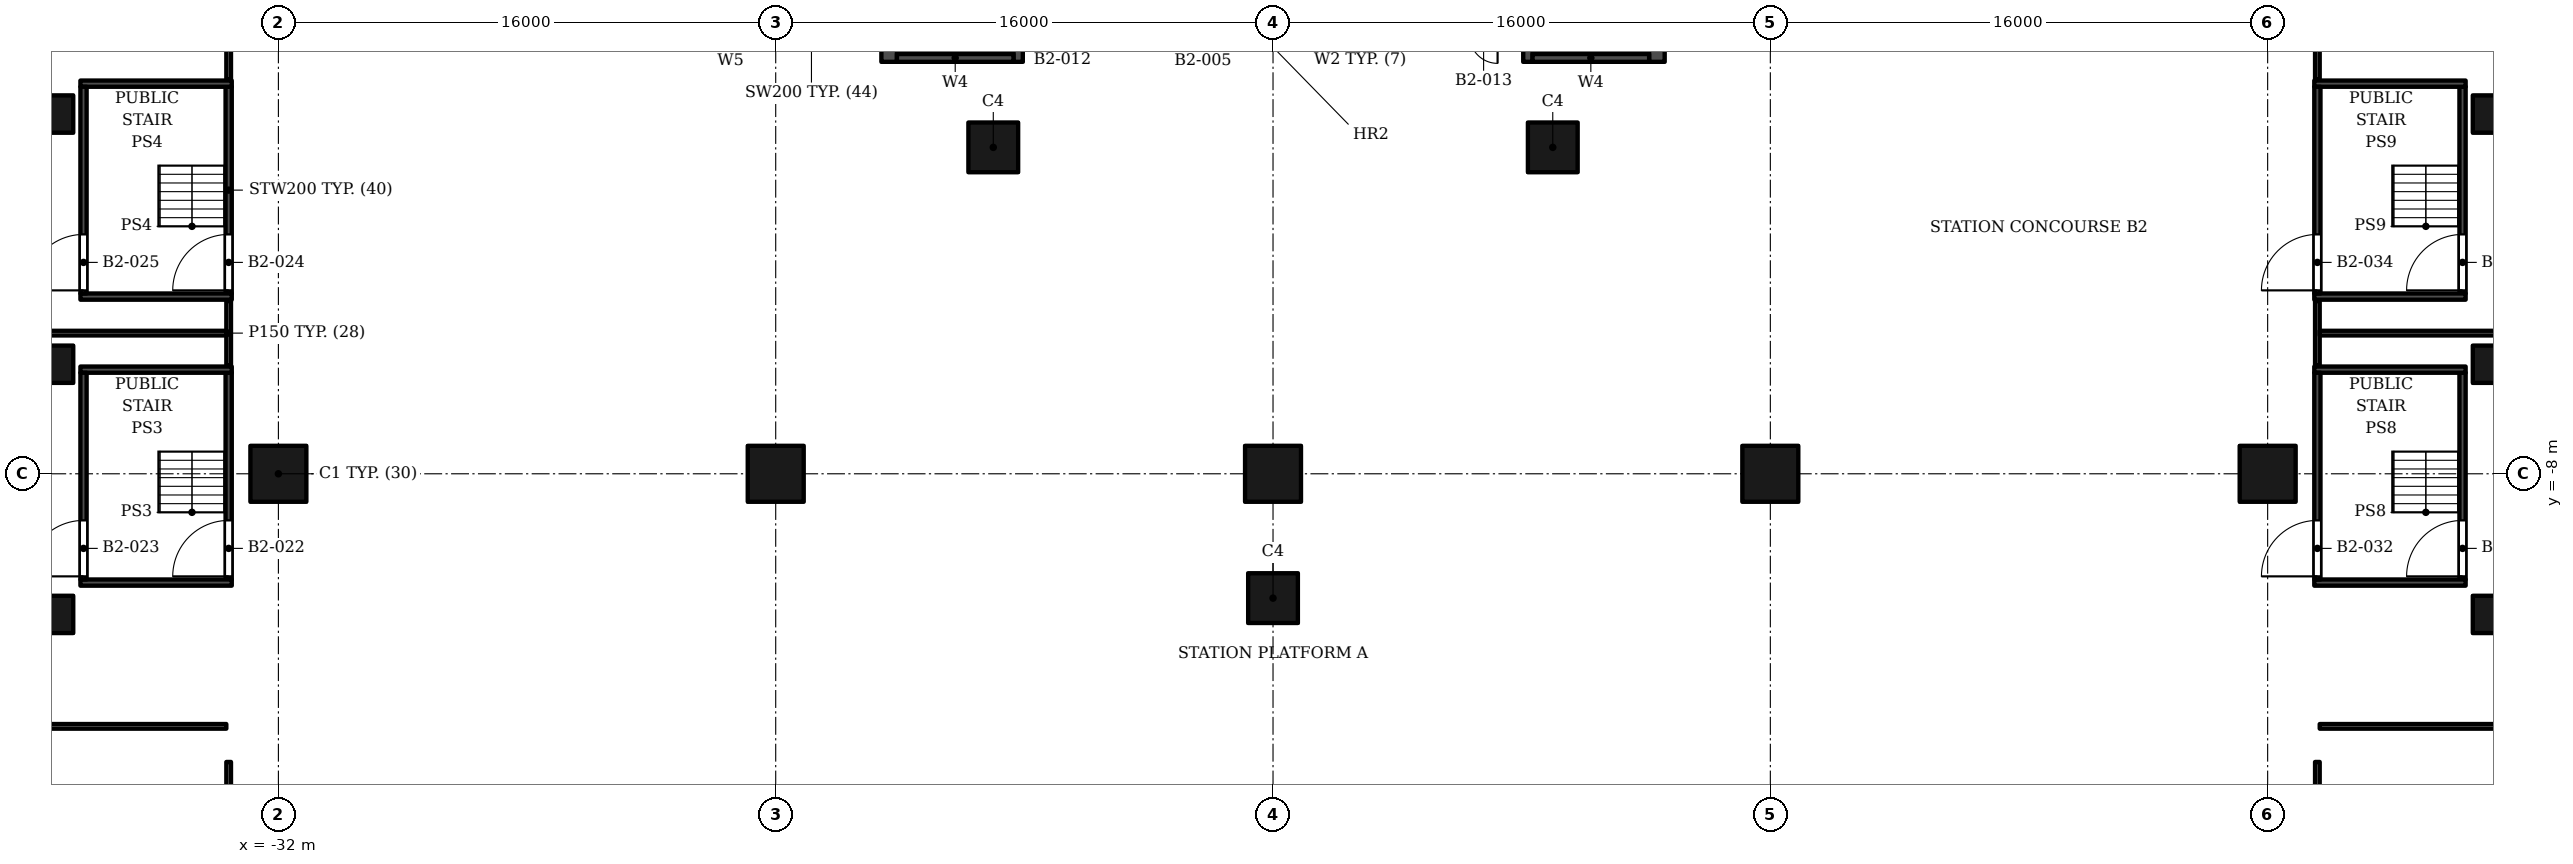
"""IFC4 building model, lengths in metres.
Left out: names, types, materials, properties, quantities, classifications, styles, units other than length and angle.
Written with IfcOpenShell. Run it as: python <this file> out.ifc"""

import sys

from ifc_helpers import new_model, si_unit, direction, frame, frame_2d, origin, origin_2d, place, context, subcontext, project, spatial, rectangle, extrude, element, fill, save


model = new_model("IFC4")
c1 = context("Model", 3, precision=1e-05, world=origin(), true_north=direction((0.0, 1.0)))
c2 = subcontext(c1, "Body", "Model", "MODEL_VIEW")
j1 = project(units=[si_unit("LENGTHUNIT", "METRE"), si_unit("PLANEANGLEUNIT", "RADIAN")], contexts=[c1])
p1 = place(None, origin())
s1 = spatial("IfcSite", under=j1, at=p1, CompositionType="ELEMENT")
p2 = place(p1, origin())
s2 = spatial("IfcBuilding", under=s1, at=p2, CompositionType="ELEMENT")
p3 = place(p2, frame((0.0, 0.0, -10.0)))
s3 = spatial("IfcBuildingStorey", under=s2, at=p3, CompositionType="ELEMENT", Elevation=-10.0)
for number, where, z_axis, x_axis in (
    (1, (-32.0, -8.0, -1.6), (0.0, 0.0, 1.0), (1.0, 0.0, 0.0)),
    (2, (-16.0, -8.0, -1.6), (0.0, 0.0, 1.0), (1.0, 0.0, 0.0)),
    (3, (0.0, -8.0, -1.6), (0.0, 0.0, 1.0), (1.0, 0.0, 0.0)),
    (4, (16.0, -8.0, -1.6), (0.0, 0.0, 1.0), (1.0, 0.0, 0.0)),
    (5, (32.0, -8.0, -1.6), (0.0, 0.0, 1.0), (1.0, 0.0, 0.0)),
):
    element("IfcColumn", number, at=place(p3, frame(where, z_axis=z_axis, x_axis=x_axis)), inside=s3, PredefinedType="COLUMN", context=c2, shape_type="SweptSolid", body=[
        extrude(rectangle(XDim=1.8, YDim=1.8, at=origin_2d()), origin(), (0.0, 0.0, 1.0), 6.6),
    ])
for number, where, z_axis, x_axis in (
    (6, (-39.2, -12.524, -1.6), (0.0, 0.0, 1.0), (1.0, 0.0, 0.0)),
    (7, (-39.2, -4.476, -1.6), (0.0, 0.0, 1.0), (1.0, 0.0, 0.0)),
    (8, (-39.2, 3.572, -1.6), (0.0, 0.0, 1.0), (1.0, 0.0, 0.0)),
    (9, (39.2, 3.572, -1.6), (0.0, 0.0, 1.0), (1.0, 0.0, 0.0)),
    (10, (39.2, -4.476, -1.6), (0.0, 0.0, 1.0), (1.0, 0.0, 0.0)),
    (11, (39.2, -12.524, -1.6), (0.0, 0.0, 1.0), (1.0, 0.0, 0.0)),
):
    element("IfcColumn", number, at=place(p3, frame(where, z_axis=z_axis, x_axis=x_axis)), inside=s3, PredefinedType="COLUMN", context=c2, shape_type="SweptSolid", body=[
        extrude(rectangle(XDim=1.2, YDim=1.2, at=origin_2d()), origin(), (0.0, 0.0, 1.0), 6.6),
    ])
for number, where, z_axis, x_axis in (
    (12, (-9.0, 2.5, -1.6), (0.0, 0.0, 1.0), (1.0, 0.0, 0.0)),
    (13, (9.0, 2.5, -1.6), (0.0, 0.0, 1.0), (1.0, 0.0, 0.0)),
    (14, (0.0, -12.0, -1.6), (0.0, 0.0, 1.0), (1.0, 0.0, 0.0)),
):
    element("IfcColumn", number, at=place(p3, frame(where, z_axis=z_axis, x_axis=x_axis)), inside=s3, PredefinedType="COLUMN", context=c2, shape_type="SweptSolid", body=[
        extrude(rectangle(XDim=1.6, YDim=1.6, at=origin_2d()), origin(), (0.0, 0.0, 1.0), 6.6),
    ])
p4 = place(p3, frame((-12.35, 5.253, -1.6), z_axis=(0.0, 0.0, 1.0), x_axis=(0.0, 1.0, 0.0)))
e15 = element("IfcWall", 15, at=p4, inside=s3, PredefinedType="SHEAR", context=c2, shape_type="SweptSolid", body=[
    extrude(rectangle(XDim=13.3, YDim=0.5, at=frame_2d((6.65, 0.0))), origin(), (0.0, 0.0, 1.0), 6.6),
])
p5 = place(p3, frame((-8.2, 5.253, -1.6), z_axis=(0.0, 0.0, 1.0), x_axis=(0.0, 1.0, 0.0)))
e16 = element("IfcWall", 16, at=p5, inside=s3, PredefinedType="SHEAR", context=c2, shape_type="SweptSolid", body=[
    extrude(rectangle(XDim=13.3, YDim=0.3, at=frame_2d((6.65, 0.0))), origin(), (0.0, 0.0, 1.0), 6.6),
])
p6 = place(p5, frame((7.1, 0.0, 1.6)))
e17 = element("IfcOpeningElement", 17, at=p6, cuts=e16, PredefinedType="OPENING", context=c2, shape_type="SweptSolid", body=[
    extrude(rectangle(XDim=1.4, YDim=2.1, at=frame_2d((0.7, 1.05))), frame((0.0, 0.16, 0.0), z_axis=(0.0, -1.0, 0.0), x_axis=(1.0, 0.0, 0.0)), (0.0, 0.0, 1.0), 0.32),
])
p7 = place(p5, frame((5.05, 0.0, 1.6)))
e18 = element("IfcOpeningElement", 18, at=p7, cuts=e16, PredefinedType="OPENING", context=c2, shape_type="SweptSolid", body=[
    extrude(rectangle(XDim=1.4, YDim=2.1, at=frame_2d((0.7, 1.05))), frame((0.0, 0.16, 0.0), z_axis=(0.0, -1.0, 0.0), x_axis=(1.0, 0.0, 0.0)), (0.0, 0.0, 1.0), 0.32),
])
p8 = place(p3, frame((-12.1, 5.378, -1.6), z_axis=(0.0, 0.0, 1.0), x_axis=(1.0, 0.0, 0.0)))
e19 = element("IfcWall", 19, at=p8, inside=s3, PredefinedType="SHEAR", context=c2, shape_type="SweptSolid", body=[
    extrude(rectangle(XDim=3.75, YDim=0.25, at=frame_2d((1.875, 0.0))), origin(), (0.0, 0.0, 1.0), 6.6),
])
p9 = place(p3, frame((12.35, 5.253, -1.6), z_axis=(0.0, 0.0, 1.0), x_axis=(0.0, 1.0, 0.0)))
e20 = element("IfcWall", 20, at=p9, inside=s3, PredefinedType="SHEAR", context=c2, shape_type="SweptSolid", body=[
    extrude(rectangle(XDim=13.3, YDim=0.5, at=frame_2d((6.65, 0.0))), origin(), (0.0, 0.0, 1.0), 6.6),
])
p10 = place(p3, frame((8.2, 5.253, -1.6), z_axis=(0.0, 0.0, 1.0), x_axis=(0.0, 1.0, 0.0)))
e21 = element("IfcWall", 21, at=p10, inside=s3, PredefinedType="SHEAR", context=c2, shape_type="SweptSolid", body=[
    extrude(rectangle(XDim=13.3, YDim=0.3, at=frame_2d((6.65, 0.0))), origin(), (0.0, 0.0, 1.0), 6.6),
])
p11 = place(p10, frame((7.1, 0.0, 1.6)))
e22 = element("IfcOpeningElement", 22, at=p11, cuts=e21, PredefinedType="OPENING", context=c2, shape_type="SweptSolid", body=[
    extrude(rectangle(XDim=1.4, YDim=2.1, at=frame_2d((0.7, 1.05))), frame((0.0, 0.16, 0.0), z_axis=(0.0, -1.0, 0.0), x_axis=(1.0, 0.0, 0.0)), (0.0, 0.0, 1.0), 0.32),
])
p12 = place(p10, frame((5.05, 0.0, 1.6)))
e23 = element("IfcOpeningElement", 23, at=p12, cuts=e21, PredefinedType="OPENING", context=c2, shape_type="SweptSolid", body=[
    extrude(rectangle(XDim=1.4, YDim=2.1, at=frame_2d((0.7, 1.05))), frame((0.0, 0.16, 0.0), z_axis=(0.0, -1.0, 0.0), x_axis=(1.0, 0.0, 0.0)), (0.0, 0.0, 1.0), 0.32),
])
p13 = place(p3, frame((8.35, 5.378, -1.6), z_axis=(0.0, 0.0, 1.0), x_axis=(1.0, 0.0, 0.0)))
e24 = element("IfcWall", 24, at=p13, inside=s3, PredefinedType="SHEAR", context=c2, shape_type="SweptSolid", body=[
    extrude(rectangle(XDim=3.75, YDim=0.25, at=frame_2d((1.875, 0.0))), origin(), (0.0, 0.0, 1.0), 6.6),
])
for number, where, z_axis, x_axis in (
    (25, (-38.37, -11.5, 0.0), (0.0, 0.0, 1.0), (1.0, 0.0, 0.0)),
    (26, (-38.37, -4.65, 0.0), (0.0, 0.0, 1.0), (1.0, 0.0, 0.0)),
):
    element("IfcWall", number, at=place(p3, frame(where, z_axis=z_axis, x_axis=x_axis)), inside=s3, PredefinedType="SOLIDWALL", context=c2, shape_type="SweptSolid", body=[
        extrude(rectangle(XDim=4.87, YDim=0.2, at=frame_2d((2.435, 0.0))), origin(), (0.0, 0.0, 1.0), 4.5),
    ])
p14 = place(p3, frame((-38.27, -11.4, 0.0), z_axis=(0.0, 0.0, 1.0), x_axis=(0.0, 1.0, 0.0)))
e27 = element("IfcWall", 27, at=p14, inside=s3, PredefinedType="SOLIDWALL", context=c2, shape_type="SweptSolid", body=[
    extrude(rectangle(XDim=6.65, YDim=0.2, at=frame_2d((3.325, 0.0))), origin(), (0.0, 0.0, 1.0), 4.5),
])
p15 = place(p14, frame((0.1, 0.0, 0.0)))
e28 = element("IfcOpeningElement", 28, at=p15, cuts=e27, PredefinedType="OPENING", context=c2, shape_type="SweptSolid", body=[
    extrude(rectangle(XDim=1.8, YDim=2.4, at=frame_2d((0.9, 1.2))), frame((0.0, 0.11, 0.0), z_axis=(0.0, -1.0, 0.0), x_axis=(1.0, 0.0, 0.0)), (0.0, 0.0, 1.0), 0.22),
])
p16 = place(p3, frame((-33.6, -11.4, 0.0), z_axis=(0.0, 0.0, 1.0), x_axis=(0.0, 1.0, 0.0)))
e29 = element("IfcWall", 29, at=p16, inside=s3, PredefinedType="SOLIDWALL", context=c2, shape_type="SweptSolid", body=[
    extrude(rectangle(XDim=6.65, YDim=0.2, at=frame_2d((3.325, 0.0))), origin(), (0.0, 0.0, 1.0), 4.5),
])
p17 = place(p16, frame((0.1, 0.0, 0.0)))
e30 = element("IfcOpeningElement", 30, at=p17, cuts=e29, PredefinedType="OPENING", context=c2, shape_type="SweptSolid", body=[
    extrude(rectangle(XDim=1.8, YDim=2.4, at=frame_2d((0.9, 1.2))), frame((0.0, 0.11, 0.0), z_axis=(0.0, -1.0, 0.0), x_axis=(1.0, 0.0, 0.0)), (0.0, 0.0, 1.0), 0.22),
])
for number, where, z_axis, x_axis in (
    (31, (-38.37, -2.3, 0.0), (0.0, 0.0, 1.0), (1.0, 0.0, 0.0)),
    (32, (-38.37, 4.55, 0.0), (0.0, 0.0, 1.0), (1.0, 0.0, 0.0)),
):
    element("IfcWall", number, at=place(p3, frame(where, z_axis=z_axis, x_axis=x_axis)), inside=s3, PredefinedType="SOLIDWALL", context=c2, shape_type="SweptSolid", body=[
        extrude(rectangle(XDim=4.87, YDim=0.2, at=frame_2d((2.435, 0.0))), origin(), (0.0, 0.0, 1.0), 4.5),
    ])
p18 = place(p3, frame((-38.27, -2.2, 0.0), z_axis=(0.0, 0.0, 1.0), x_axis=(0.0, 1.0, 0.0)))
e33 = element("IfcWall", 33, at=p18, inside=s3, PredefinedType="SOLIDWALL", context=c2, shape_type="SweptSolid", body=[
    extrude(rectangle(XDim=6.65, YDim=0.2, at=frame_2d((3.325, 0.0))), origin(), (0.0, 0.0, 1.0), 4.5),
])
p19 = place(p18, frame((0.1, 0.0, 0.0)))
e34 = element("IfcOpeningElement", 34, at=p19, cuts=e33, PredefinedType="OPENING", context=c2, shape_type="SweptSolid", body=[
    extrude(rectangle(XDim=1.8, YDim=2.4, at=frame_2d((0.9, 1.2))), frame((0.0, 0.11, 0.0), z_axis=(0.0, -1.0, 0.0), x_axis=(1.0, 0.0, 0.0)), (0.0, 0.0, 1.0), 0.22),
])
p20 = place(p3, frame((-33.6, -2.2, 0.0), z_axis=(0.0, 0.0, 1.0), x_axis=(0.0, 1.0, 0.0)))
e35 = element("IfcWall", 35, at=p20, inside=s3, PredefinedType="SOLIDWALL", context=c2, shape_type="SweptSolid", body=[
    extrude(rectangle(XDim=6.65, YDim=0.2, at=frame_2d((3.325, 0.0))), origin(), (0.0, 0.0, 1.0), 4.5),
])
p21 = place(p20, frame((0.1, 0.0, 0.0)))
e36 = element("IfcOpeningElement", 36, at=p21, cuts=e35, PredefinedType="OPENING", context=c2, shape_type="SweptSolid", body=[
    extrude(rectangle(XDim=1.8, YDim=2.4, at=frame_2d((0.9, 1.2))), frame((0.0, 0.11, 0.0), z_axis=(0.0, -1.0, 0.0), x_axis=(1.0, 0.0, 0.0)), (0.0, 0.0, 1.0), 0.22),
])
for number, where, z_axis, x_axis in (
    (37, (33.5, -11.5, 0.0), (0.0, 0.0, 1.0), (1.0, 0.0, 0.0)),
    (38, (33.5, -4.65, 0.0), (0.0, 0.0, 1.0), (1.0, 0.0, 0.0)),
):
    element("IfcWall", number, at=place(p3, frame(where, z_axis=z_axis, x_axis=x_axis)), inside=s3, PredefinedType="SOLIDWALL", context=c2, shape_type="SweptSolid", body=[
        extrude(rectangle(XDim=4.87, YDim=0.2, at=frame_2d((2.435, 0.0))), origin(), (0.0, 0.0, 1.0), 4.5),
    ])
p22 = place(p3, frame((33.6, -11.4, 0.0), z_axis=(0.0, 0.0, 1.0), x_axis=(0.0, 1.0, 0.0)))
e39 = element("IfcWall", 39, at=p22, inside=s3, PredefinedType="SOLIDWALL", context=c2, shape_type="SweptSolid", body=[
    extrude(rectangle(XDim=6.65, YDim=0.2, at=frame_2d((3.325, 0.0))), origin(), (0.0, 0.0, 1.0), 4.5),
])
p23 = place(p22, frame((0.1, 0.0, 0.0)))
e40 = element("IfcOpeningElement", 40, at=p23, cuts=e39, PredefinedType="OPENING", context=c2, shape_type="SweptSolid", body=[
    extrude(rectangle(XDim=1.8, YDim=2.4, at=frame_2d((0.9, 1.2))), frame((0.0, 0.11, 0.0), z_axis=(0.0, -1.0, 0.0), x_axis=(1.0, 0.0, 0.0)), (0.0, 0.0, 1.0), 0.22),
])
p24 = place(p3, frame((38.27, -11.4, 0.0), z_axis=(0.0, 0.0, 1.0), x_axis=(0.0, 1.0, 0.0)))
e41 = element("IfcWall", 41, at=p24, inside=s3, PredefinedType="SOLIDWALL", context=c2, shape_type="SweptSolid", body=[
    extrude(rectangle(XDim=6.65, YDim=0.2, at=frame_2d((3.325, 0.0))), origin(), (0.0, 0.0, 1.0), 4.5),
])
p25 = place(p24, frame((0.1, 0.0, 0.0)))
e42 = element("IfcOpeningElement", 42, at=p25, cuts=e41, PredefinedType="OPENING", context=c2, shape_type="SweptSolid", body=[
    extrude(rectangle(XDim=1.8, YDim=2.4, at=frame_2d((0.9, 1.2))), frame((0.0, 0.11, 0.0), z_axis=(0.0, -1.0, 0.0), x_axis=(1.0, 0.0, 0.0)), (0.0, 0.0, 1.0), 0.22),
])
for number, where, z_axis, x_axis in (
    (43, (33.5, -2.3, 0.0), (0.0, 0.0, 1.0), (1.0, 0.0, 0.0)),
    (44, (33.5, 4.55, 0.0), (0.0, 0.0, 1.0), (1.0, 0.0, 0.0)),
):
    element("IfcWall", number, at=place(p3, frame(where, z_axis=z_axis, x_axis=x_axis)), inside=s3, PredefinedType="SOLIDWALL", context=c2, shape_type="SweptSolid", body=[
        extrude(rectangle(XDim=4.87, YDim=0.2, at=frame_2d((2.435, 0.0))), origin(), (0.0, 0.0, 1.0), 4.5),
    ])
p26 = place(p3, frame((33.6, -2.2, 0.0), z_axis=(0.0, 0.0, 1.0), x_axis=(0.0, 1.0, 0.0)))
e45 = element("IfcWall", 45, at=p26, inside=s3, PredefinedType="SOLIDWALL", context=c2, shape_type="SweptSolid", body=[
    extrude(rectangle(XDim=6.65, YDim=0.2, at=frame_2d((3.325, 0.0))), origin(), (0.0, 0.0, 1.0), 4.5),
])
p27 = place(p26, frame((0.1, 0.0, 0.0)))
e46 = element("IfcOpeningElement", 46, at=p27, cuts=e45, PredefinedType="OPENING", context=c2, shape_type="SweptSolid", body=[
    extrude(rectangle(XDim=1.8, YDim=2.4, at=frame_2d((0.9, 1.2))), frame((0.0, 0.11, 0.0), z_axis=(0.0, -1.0, 0.0), x_axis=(1.0, 0.0, 0.0)), (0.0, 0.0, 1.0), 0.22),
])
p28 = place(p3, frame((38.27, -2.2, 0.0), z_axis=(0.0, 0.0, 1.0), x_axis=(0.0, 1.0, 0.0)))
e47 = element("IfcWall", 47, at=p28, inside=s3, PredefinedType="SOLIDWALL", context=c2, shape_type="SweptSolid", body=[
    extrude(rectangle(XDim=6.65, YDim=0.2, at=frame_2d((3.325, 0.0))), origin(), (0.0, 0.0, 1.0), 4.5),
])
p29 = place(p28, frame((0.1, 0.0, 0.0)))
e48 = element("IfcOpeningElement", 48, at=p29, cuts=e47, PredefinedType="OPENING", context=c2, shape_type="SweptSolid", body=[
    extrude(rectangle(XDim=1.8, YDim=2.4, at=frame_2d((0.9, 1.2))), frame((0.0, 0.11, 0.0), z_axis=(0.0, -1.0, 0.0), x_axis=(1.0, 0.0, 0.0)), (0.0, 0.0, 1.0), 0.22),
])
for number, where, z_axis, x_axis in (
    (49, (-33.6, -20.61, 0.0), (0.0, 0.0, 1.0), (0.0, 1.0, 0.0)),
    (50, (33.6, -20.61, 0.0), (0.0, 0.0, 1.0), (0.0, 1.0, 0.0)),
):
    element("IfcWall", number, at=place(p3, frame(where, z_axis=z_axis, x_axis=x_axis)), inside=s3, PredefinedType="PARTITIONING", context=c2, shape_type="SweptSolid", body=[
        extrude(rectangle(XDim=3.34, YDim=0.15, at=frame_2d((1.67, 0.0))), origin(), (0.0, 0.0, 1.0), 4.5),
    ])
for number, where, z_axis, x_axis in (
    (51, (-49.775, -16.125, 0.0), (0.0, 0.0, 1.0), (1.0, 0.0, 0.0)),
    (52, (33.675, -16.125, 0.0), (0.0, 0.0, 1.0), (1.0, 0.0, 0.0)),
):
    element("IfcWall", number, at=place(p3, frame(where, z_axis=z_axis, x_axis=x_axis)), inside=s3, PredefinedType="PARTITIONING", context=c2, shape_type="SweptSolid", body=[
        extrude(rectangle(XDim=16.1, YDim=0.15, at=frame_2d((8.05, 0.0))), origin(), (0.0, 0.0, 1.0), 4.5),
    ])
for number, where, z_axis, x_axis in (
    (53, (-33.6, -4.51, 0.0), (0.0, 0.0, 1.0), (0.0, 1.0, 0.0)),
    (54, (33.6, -4.51, 0.0), (0.0, 0.0, 1.0), (0.0, 1.0, 0.0)),
):
    element("IfcWall", number, at=place(p3, frame(where, z_axis=z_axis, x_axis=x_axis)), inside=s3, PredefinedType="PARTITIONING", context=c2, shape_type="SweptSolid", body=[
        extrude(rectangle(XDim=2.07, YDim=0.15, at=frame_2d((1.035, 0.0))), origin(), (0.0, 0.0, 1.0), 4.5),
    ])
for number, where, z_axis, x_axis in (
    (55, (-49.775, -3.475, 0.0), (0.0, 0.0, 1.0), (1.0, 0.0, 0.0)),
    (56, (33.675, -3.475, 0.0), (0.0, 0.0, 1.0), (1.0, 0.0, 0.0)),
):
    element("IfcWall", number, at=place(p3, frame(where, z_axis=z_axis, x_axis=x_axis)), inside=s3, PredefinedType="PARTITIONING", context=c2, shape_type="SweptSolid", body=[
        extrude(rectangle(XDim=16.1, YDim=0.15, at=frame_2d((8.05, 0.0))), origin(), (0.0, 0.0, 1.0), 4.5),
    ])
p30 = place(p3, frame((-33.6, 4.69, 0.0), z_axis=(0.0, 0.0, 1.0), x_axis=(0.0, 1.0, 0.0)))
e57 = element("IfcWall", 57, at=p30, inside=s3, PredefinedType="PARTITIONING", context=c2, shape_type="SweptSolid", body=[
    extrude(rectangle(XDim=9.07, YDim=0.15, at=frame_2d((4.535, 0.0))), origin(), (0.0, 0.0, 1.0), 3.3),
])
p31 = place(p30, frame((5.885, 0.0, 0.0)))
e58 = element("IfcOpeningElement", 58, at=p31, cuts=e57, PredefinedType="OPENING", context=c2, shape_type="SweptSolid", body=[
    extrude(rectangle(XDim=1.0, YDim=2.1, at=frame_2d((0.5, 1.05))), frame((0.0, 0.085, 0.0), z_axis=(0.0, -1.0, 0.0), x_axis=(1.0, 0.0, 0.0)), (0.0, 0.0, 1.0), 0.17),
])
p32 = place(p3, frame((33.6, 4.69, 0.0), z_axis=(0.0, 0.0, 1.0), x_axis=(0.0, 1.0, 0.0)))
e59 = element("IfcWall", 59, at=p32, inside=s3, PredefinedType="PARTITIONING", context=c2, shape_type="SweptSolid", body=[
    extrude(rectangle(XDim=9.07, YDim=0.15, at=frame_2d((4.535, 0.0))), origin(), (0.0, 0.0, 1.0), 3.3),
])
p33 = place(p32, frame((5.859, 0.0, 0.0)))
e60 = element("IfcOpeningElement", 60, at=p33, cuts=e59, PredefinedType="OPENING", context=c2, shape_type="SweptSolid", body=[
    extrude(rectangle(XDim=1.0, YDim=2.1, at=frame_2d((0.5, 1.05))), frame((0.0, 0.085, 0.0), z_axis=(0.0, -1.0, 0.0), x_axis=(1.0, 0.0, 0.0)), (0.0, 0.0, 1.0), 0.17),
])
p34 = place(p17, origin())
e61 = element("IfcDoor", 61, at=p34, inside=s3, OperationType="DOUBLE_DOOR_SINGLE_SWING", PredefinedType="DOOR", context=c2, shape_type="SweptSolid", body=[
    extrude(rectangle(XDim=1.8, YDim=2.4, at=frame_2d((0.9, 1.2))), frame((0.0, 0.025, 0.0), z_axis=(0.0, -1.0, 0.0), x_axis=(1.0, 0.0, 0.0)), (0.0, 0.0, 1.0), 0.05),
])
fill(e30, e61)
p35 = place(p15, origin())
e62 = element("IfcDoor", 62, at=p35, inside=s3, OperationType="DOUBLE_DOOR_SINGLE_SWING", PredefinedType="DOOR", context=c2, shape_type="SweptSolid", body=[
    extrude(rectangle(XDim=1.8, YDim=2.4, at=frame_2d((0.9, 1.2))), frame((0.0, 0.025, 0.0), z_axis=(0.0, -1.0, 0.0), x_axis=(1.0, 0.0, 0.0)), (0.0, 0.0, 1.0), 0.05),
])
fill(e28, e62)
p36 = place(p21, origin())
e63 = element("IfcDoor", 63, at=p36, inside=s3, OperationType="DOUBLE_DOOR_SINGLE_SWING", PredefinedType="DOOR", context=c2, shape_type="SweptSolid", body=[
    extrude(rectangle(XDim=1.8, YDim=2.4, at=frame_2d((0.9, 1.2))), frame((0.0, 0.025, 0.0), z_axis=(0.0, -1.0, 0.0), x_axis=(1.0, 0.0, 0.0)), (0.0, 0.0, 1.0), 0.05),
])
fill(e36, e63)
p37 = place(p19, origin())
e64 = element("IfcDoor", 64, at=p37, inside=s3, OperationType="DOUBLE_DOOR_SINGLE_SWING", PredefinedType="DOOR", context=c2, shape_type="SweptSolid", body=[
    extrude(rectangle(XDim=1.8, YDim=2.4, at=frame_2d((0.9, 1.2))), frame((0.0, 0.025, 0.0), z_axis=(0.0, -1.0, 0.0), x_axis=(1.0, 0.0, 0.0)), (0.0, 0.0, 1.0), 0.05),
])
fill(e34, e64)
p38 = place(p23, origin())
e65 = element("IfcDoor", 65, at=p38, inside=s3, OperationType="DOUBLE_DOOR_SINGLE_SWING", PredefinedType="DOOR", context=c2, shape_type="SweptSolid", body=[
    extrude(rectangle(XDim=1.8, YDim=2.4, at=frame_2d((0.9, 1.2))), frame((0.0, 0.025, 0.0), z_axis=(0.0, -1.0, 0.0), x_axis=(1.0, 0.0, 0.0)), (0.0, 0.0, 1.0), 0.05),
])
fill(e40, e65)
p39 = place(p25, origin())
e66 = element("IfcDoor", 66, at=p39, inside=s3, OperationType="DOUBLE_DOOR_SINGLE_SWING", PredefinedType="DOOR", context=c2, shape_type="SweptSolid", body=[
    extrude(rectangle(XDim=1.8, YDim=2.4, at=frame_2d((0.9, 1.2))), frame((0.0, 0.025, 0.0), z_axis=(0.0, -1.0, 0.0), x_axis=(1.0, 0.0, 0.0)), (0.0, 0.0, 1.0), 0.05),
])
fill(e42, e66)
p40 = place(p27, origin())
e67 = element("IfcDoor", 67, at=p40, inside=s3, OperationType="DOUBLE_DOOR_SINGLE_SWING", PredefinedType="DOOR", context=c2, shape_type="SweptSolid", body=[
    extrude(rectangle(XDim=1.8, YDim=2.4, at=frame_2d((0.9, 1.2))), frame((0.0, 0.025, 0.0), z_axis=(0.0, -1.0, 0.0), x_axis=(1.0, 0.0, 0.0)), (0.0, 0.0, 1.0), 0.05),
])
fill(e46, e67)
p41 = place(p29, origin())
e68 = element("IfcDoor", 68, at=p41, inside=s3, OperationType="DOUBLE_DOOR_SINGLE_SWING", PredefinedType="DOOR", context=c2, shape_type="SweptSolid", body=[
    extrude(rectangle(XDim=1.8, YDim=2.4, at=frame_2d((0.9, 1.2))), frame((0.0, 0.025, 0.0), z_axis=(0.0, -1.0, 0.0), x_axis=(1.0, 0.0, 0.0)), (0.0, 0.0, 1.0), 0.05),
])
fill(e48, e68)
save(model, sys.argv[1])
